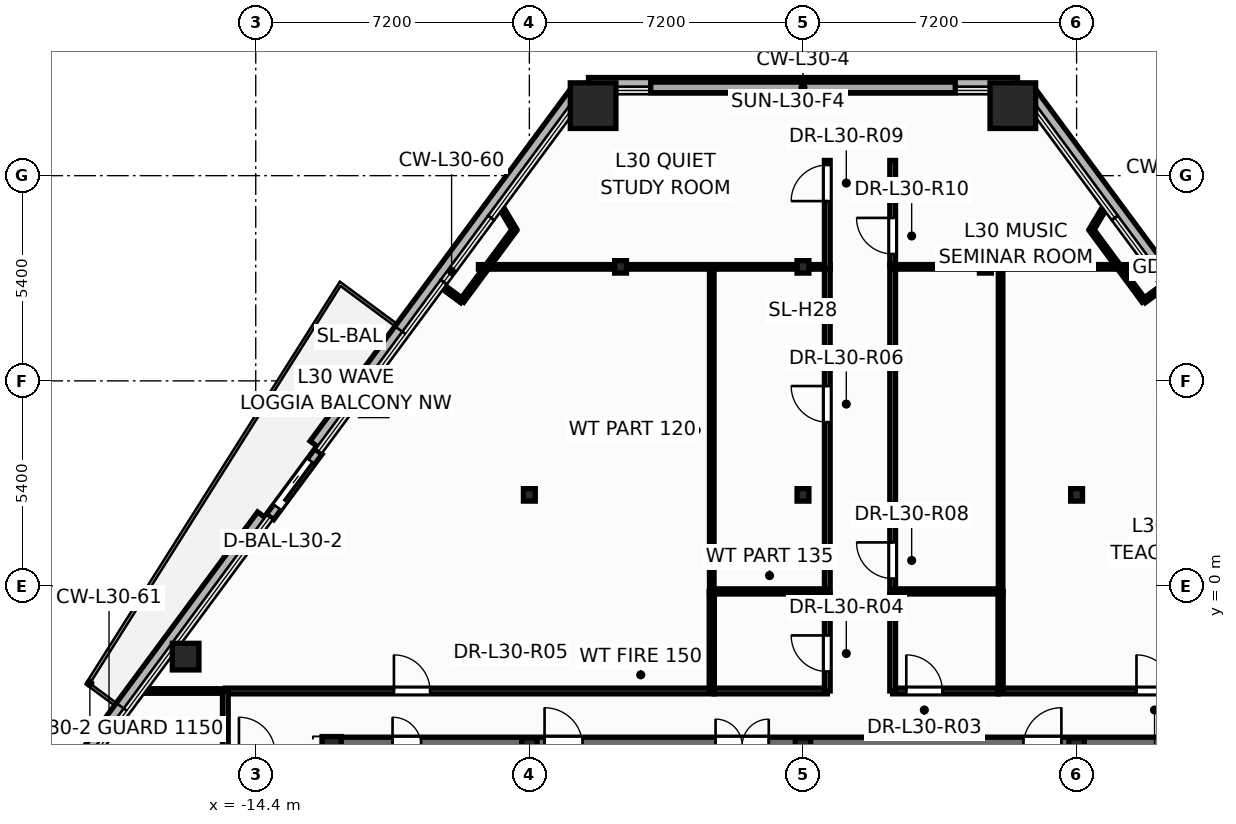
"""IFC4 building model, lengths in metres.
Left out: names, types, materials, properties, quantities, classifications, styles, units other than length and angle.
Written with IfcOpenShell. Run it as: python <this file> out.ifc"""

import sys

from ifc_helpers import new_model, si_unit, direction, frame, frame_2d, origin, origin_2d, place, context, subcontext, project, spatial, rectangle, hollow_rectangle, hollow_circle, i_section, extrude, element, fill, save


model = new_model("IFC4")
c1 = context("Model", 3, precision=1e-05, world=origin(), true_north=direction((0.0, 1.0)))
c2 = subcontext(c1, "Body", "Model", "MODEL_VIEW")
j1 = project(units=[si_unit("LENGTHUNIT", "METRE"), si_unit("PLANEANGLEUNIT", "RADIAN")], contexts=[c1])
p1 = place(None, origin())
s1 = spatial("IfcSite", under=j1, at=p1, CompositionType="ELEMENT")
p2 = place(p1, origin())
s2 = spatial("IfcBuilding", under=s1, at=p2, CompositionType="ELEMENT")
p3 = place(p2, frame((0.0, 0.0, 117.6)))
s3 = spatial("IfcBuildingStorey", under=s2, at=p3, CompositionType="ELEMENT", Elevation=117.6)
for number, where, z_axis, x_axis in (
    (1, (5.522, 12.642, 0.0), (0.0, 0.0, 1.0), (1.0, 0.0, 0.0)),
    (2, (-5.522, 12.642, 0.0), (0.0, 0.0, 1.0), (1.0, 0.0, 0.0)),
):
    element("IfcColumn", number, at=place(p3, frame(where, z_axis=z_axis, x_axis=x_axis)), inside=s3, PredefinedType="COLUMN", context=c2, shape_type="SweptSolid", body=[
        extrude(hollow_rectangle(XDim=1.2, YDim=1.2, WallThickness=0.055, at=origin_2d()), origin(), (0.0, 0.0, 1.0), 4.5),
    ])
for number, where, z_axis, x_axis in (
    (3, (-11.296, 4.836, 0.0), (0.0, 0.0, 1.0), (1.0, 0.0, 0.0)),
    (4, (-16.245, -1.856, 0.0), (0.0, 0.0, 1.0), (1.0, 0.0, 0.0)),
):
    element("IfcColumn", number, at=place(p3, frame(where, z_axis=z_axis, x_axis=x_axis)), inside=s3, PredefinedType="COLUMN", context=c2, shape_type="SweptSolid", body=[
        extrude(hollow_circle(Radius=0.35, WallThickness=0.03, at=origin_2d()), origin(), (0.0, 0.0, 1.0), 4.5),
    ])
p4 = place(p3, frame((-12.4, -4.2, 0.0), z_axis=(0.0, 0.0, 1.0), x_axis=(1.0, 0.0, 0.0)))
e5 = element("IfcColumn", 5, at=p4, inside=s3, PredefinedType="COLUMN", context=c2, shape_type="SweptSolid", body=[
    extrude(i_section(OverallWidth=0.5, OverallDepth=0.482, WebThickness=0.04, FlangeThickness=0.045, at=origin_2d()), origin(), (0.0, 0.0, 1.0), 4.5),
])
for number, where, z_axis, x_axis in (
    (6, (-7.2, -4.2, 0.0), (0.0, 0.0, 1.0), (1.0, 0.0, 0.0)),
    (7, (0.0, -4.2, 0.0), (0.0, 0.0, 1.0), (1.0, 0.0, 0.0)),
    (8, (7.2, -4.2, 0.0), (0.0, 0.0, 1.0), (1.0, 0.0, 0.0)),
):
    element("IfcColumn", number, at=place(p3, frame(where, z_axis=z_axis, x_axis=x_axis)), inside=s3, PredefinedType="PILASTER", context=c2, shape_type="SweptSolid", body=[
        extrude(i_section(OverallWidth=0.405, OverallDepth=0.414, WebThickness=0.022, FlangeThickness=0.032, at=origin_2d()), origin(), (0.0, 0.0, 1.0), 4.5),
    ])
for number, where, z_axis, x_axis in (
    (9, (-7.2, 2.4, 0.0), (0.0, 0.0, 1.0), (1.0, 0.0, 0.0)),
    (10, (0.0, 2.4, 0.0), (0.0, 0.0, 1.0), (1.0, 0.0, 0.0)),
    (11, (7.2, 2.4, 0.0), (0.0, 0.0, 1.0), (1.0, 0.0, 0.0)),
    (12, (-4.8, 8.4, 0.0), (0.0, 0.0, 1.0), (1.0, 0.0, 0.0)),
    (13, (0.0, 8.4, 0.0), (0.0, 0.0, 1.0), (1.0, 0.0, 0.0)),
    (14, (4.8, 8.4, 0.0), (0.0, 0.0, 1.0), (1.0, 0.0, 0.0)),
):
    element("IfcColumn", number, at=place(p3, frame(where, z_axis=z_axis, x_axis=x_axis)), inside=s3, PredefinedType="COLUMN", context=c2, shape_type="SweptSolid", body=[
        extrude(i_section(OverallWidth=0.311, OverallDepth=0.327, WebThickness=0.016, FlangeThickness=0.025, at=origin_2d()), origin(), (0.0, 0.0, 1.0), 4.5),
    ])
p5 = place(p3, frame((14.117, 1.963, -0.2), z_axis=(0.0, 0.0, 1.0), x_axis=(-0.594628189486, 0.804000818575, 0.0)))
e15 = element("IfcWall", 15, at=p5, inside=s3, PredefinedType="PARAPET", context=c2, shape_type="SweptSolid", body=[
    extrude(rectangle(XDim=13.778, YDim=0.36, at=frame_2d((6.889, 0.0))), origin(), (0.0, 0.0, 1.0), 0.38),
])
p6 = place(p3, frame((5.644, 13.202, -0.2), z_axis=(0.0, 0.0, 1.0), x_axis=(-1.0, 0.0, 0.0)))
e16 = element("IfcWall", 16, at=p6, inside=s3, PredefinedType="PARAPET", context=c2, shape_type="SweptSolid", body=[
    extrude(rectangle(XDim=11.289, YDim=0.36, at=frame_2d((5.644, 0.0))), origin(), (0.0, 0.0, 1.0), 0.38),
])
p7 = place(p3, frame((-5.924, 13.041, -0.2), z_axis=(0.0, 0.0, 1.0), x_axis=(-0.594628785206, -0.804000377988, 0.0)))
e17 = element("IfcWall", 17, at=p7, inside=s3, PredefinedType="PARAPET", context=c2, shape_type="SweptSolid", body=[
    extrude(rectangle(XDim=11.607, YDim=0.36, at=frame_2d((5.803, 0.0))), origin(), (0.0, 0.0, 1.0), 0.38),
])
p8 = place(p3, frame((-14.206, 1.843, -0.2), z_axis=(0.0, 0.0, 1.0), x_axis=(-0.594634463254, -0.803996178542, 0.0)))
e18 = element("IfcWall", 18, at=p8, inside=s3, PredefinedType="PARAPET", context=c2, shape_type="SweptSolid", body=[
    extrude(rectangle(XDim=14.072, YDim=0.36, at=frame_2d((7.036, 0.0))), origin(), (0.0, 0.0, 1.0), 0.38),
])
p9 = place(p3, frame((-12.751, 3.541, -0.015), z_axis=(0.0, 0.0, 1.0), x_axis=(-0.594638042479, -0.80399353134, 0.0)))
e19 = element("IfcWall", 19, at=p9, inside=s3, PredefinedType="STANDARD", context=c2, shape_type="SweptSolid", body=[
    extrude(rectangle(XDim=2.14, YDim=0.24, at=frame_2d((1.07, 0.0))), origin(), (0.0, 0.0, 1.0), 3.707),
])
p10 = place(p9, frame((0.32, 0.0, 0.015)))
e20 = element("IfcOpeningElement", 20, at=p10, cuts=e19, PredefinedType="OPENING", context=c2, shape_type="SweptSolid", body=[
    extrude(rectangle(XDim=1.506, YDim=2.204, at=frame_2d((0.75, 1.102))), frame((0.0, 0.13, 0.0), z_axis=(0.0, -1.0, 0.0), x_axis=(1.0, 0.0, 0.0)), (0.0, 0.0, 1.0), 0.26),
])
p11 = place(p3, frame((-12.65, -4.2, 0.0), z_axis=(0.0, 0.0, 1.0), x_axis=(1.0, 0.0, 0.0)))
e21 = element("IfcWall", 21, at=p11, inside=s3, PredefinedType="SHEAR", context=c2, shape_type="SweptSolid", body=[
    extrude(rectangle(XDim=25.3, YDim=0.45, at=frame_2d((12.65, 0.0))), origin(), (0.0, 0.0, 1.0), 4.5),
])
p12 = place(p11, frame((1.85, 0.0, 0.0)))
e22 = element("IfcOpeningElement", 22, at=p12, cuts=e21, PredefinedType="OPENING", context=c2, shape_type="SweptSolid", body=[
    extrude(rectangle(XDim=0.756, YDim=2.054, at=frame_2d((0.375, 1.027))), frame((0.0, 0.235, 0.0), z_axis=(0.0, -1.0, 0.0), x_axis=(1.0, 0.0, 0.0)), (0.0, 0.0, 1.0), 0.47),
])
p13 = place(p11, frame((22.65, 0.0, 0.0)))
e23 = element("IfcOpeningElement", 23, at=p13, cuts=e21, PredefinedType="OPENING", context=c2, shape_type="SweptSolid", body=[
    extrude(rectangle(XDim=0.756, YDim=2.054, at=frame_2d((0.375, 1.027))), frame((0.0, 0.235, 0.0), z_axis=(0.0, -1.0, 0.0), x_axis=(1.0, 0.0, 0.0)), (0.0, 0.0, 1.0), 0.47),
])
p14 = place(p11, frame((5.85, 0.0, 0.0)))
e24 = element("IfcOpeningElement", 24, at=p14, cuts=e21, PredefinedType="OPENING", context=c2, shape_type="SweptSolid", body=[
    extrude(rectangle(XDim=1.006, YDim=2.104, at=frame_2d((0.5, 1.052))), frame((0.0, 0.235, 0.0), z_axis=(0.0, -1.0, 0.0), x_axis=(1.0, 0.0, 0.0)), (0.0, 0.0, 1.0), 0.47),
])
p15 = place(p11, frame((10.35, 0.0, 0.0)))
e25 = element("IfcOpeningElement", 25, at=p15, cuts=e21, PredefinedType="OPENING", context=c2, shape_type="SweptSolid", body=[
    extrude(rectangle(XDim=1.406, YDim=2.154, at=frame_2d((0.7, 1.077))), frame((0.0, 0.235, 0.0), z_axis=(0.0, -1.0, 0.0), x_axis=(1.0, 0.0, 0.0)), (0.0, 0.0, 1.0), 0.47),
])
p16 = place(p11, frame((18.45, 0.0, 0.0)))
e26 = element("IfcOpeningElement", 26, at=p16, cuts=e21, PredefinedType="OPENING", context=c2, shape_type="SweptSolid", body=[
    extrude(rectangle(XDim=1.006, YDim=2.104, at=frame_2d((0.5, 1.052))), frame((0.0, 0.235, 0.0), z_axis=(0.0, -1.0, 0.0), x_axis=(1.0, 0.0, 0.0)), (0.0, 0.0, 1.0), 0.47),
])
p17 = place(p3, frame((-15.2, -2.76, 0.0), z_axis=(0.0, 0.0, 1.0), x_axis=(1.0, 0.0, 0.0)))
e27 = element("IfcWall", 27, at=p17, inside=s3, PredefinedType="PARTITIONING", context=c2, shape_type="SweptSolid", body=[
    extrude(rectangle(XDim=12.86, YDim=0.15, at=frame_2d((6.43, 0.0))), origin(), (0.0, 0.0, 1.0), 3.225),
])
p18 = place(p17, frame((4.436, 0.0, 0.0)))
e28 = element("IfcOpeningElement", 28, at=p18, cuts=e27, PredefinedType="OPENING", context=c2, shape_type="SweptSolid", body=[
    extrude(rectangle(XDim=0.956, YDim=2.104, at=frame_2d((0.475, 1.052))), frame((0.0, 0.085, 0.0), z_axis=(0.0, -1.0, 0.0), x_axis=(1.0, 0.0, 0.0)), (0.0, 0.0, 1.0), 0.17),
])
p19 = place(p3, frame((5.14, -2.76, 0.0), z_axis=(0.0, 0.0, 1.0), x_axis=(1.0, 0.0, 0.0)))
e29 = element("IfcWall", 29, at=p19, inside=s3, PredefinedType="PARTITIONING", context=c2, shape_type="SweptSolid", body=[
    extrude(rectangle(XDim=10.06, YDim=0.15, at=frame_2d((5.03, 0.0))), origin(), (0.0, 0.0, 1.0), 3.225),
])
p20 = place(p19, frame((3.636, 0.0, 0.0)))
e30 = element("IfcOpeningElement", 30, at=p20, cuts=e29, PredefinedType="OPENING", context=c2, shape_type="SweptSolid", body=[
    extrude(rectangle(XDim=0.956, YDim=2.104, at=frame_2d((0.475, 1.052))), frame((0.0, 0.085, 0.0), z_axis=(0.0, -1.0, 0.0), x_axis=(1.0, 0.0, 0.0)), (0.0, 0.0, 1.0), 0.17),
])
p21 = place(p3, frame((0.64, -0.2, 0.0), z_axis=(0.0, 0.0, 1.0), x_axis=(0.0, 1.0, 0.0)))
e31 = element("IfcWall", 31, at=p21, inside=s3, PredefinedType="PARTITIONING", context=c2, shape_type="SweptSolid", body=[
    extrude(rectangle(XDim=8.66, YDim=0.15, at=frame_2d((4.33, 0.0))), origin(), (0.0, 0.0, 1.0), 3.225),
])
p22 = place(p21, frame((4.514, 0.0, 0.0)))
e32 = element("IfcOpeningElement", 32, at=p22, cuts=e31, PredefinedType="OPENING", context=c2, shape_type="SweptSolid", body=[
    extrude(rectangle(XDim=0.956, YDim=2.104, at=frame_2d((0.475, 1.052))), frame((0.0, 0.085, 0.0), z_axis=(0.0, -1.0, 0.0), x_axis=(1.0, 0.0, 0.0)), (0.0, 0.0, 1.0), 0.17),
])
p23 = place(p3, frame((2.36, -0.2, 0.0), z_axis=(0.0, 0.0, 1.0), x_axis=(0.0, 1.0, 0.0)))
e33 = element("IfcWall", 33, at=p23, inside=s3, PredefinedType="PARTITIONING", context=c2, shape_type="SweptSolid", body=[
    extrude(rectangle(XDim=8.66, YDim=0.15, at=frame_2d((4.33, 0.0))), origin(), (0.0, 0.0, 1.0), 3.225),
])
p24 = place(p23, frame((0.4, 0.0, 0.0)))
e34 = element("IfcOpeningElement", 34, at=p24, cuts=e33, PredefinedType="OPENING", context=c2, shape_type="SweptSolid", body=[
    extrude(rectangle(XDim=0.956, YDim=2.104, at=frame_2d((0.475, 1.052))), frame((0.0, 0.085, 0.0), z_axis=(0.0, -1.0, 0.0), x_axis=(1.0, 0.0, 0.0)), (0.0, 0.0, 1.0), 0.17),
])
for number, where, z_axis, x_axis in (
    (35, (-2.4, -0.2, 0.0), (0.0, 0.0, 1.0), (0.0, 1.0, 0.0)),
    (36, (5.2, -0.2, 0.0), (0.0, 0.0, 1.0), (0.0, 1.0, 0.0)),
):
    element("IfcWall", number, at=place(p3, frame(where, z_axis=z_axis, x_axis=x_axis)), inside=s3, PredefinedType="PARTITIONING", context=c2, shape_type="SweptSolid", body=[
        extrude(rectangle(XDim=8.6, YDim=0.12, at=frame_2d((4.3, 0.0))), origin(), (0.0, 0.0, 1.0), 3.225),
    ])
p25 = place(p3, frame((-8.54, 8.4, 0.0), z_axis=(0.0, 0.0, 1.0), x_axis=(1.0, 0.0, 0.0)))
e37 = element("IfcWall", 37, at=p25, inside=s3, PredefinedType="PARTITIONING", context=c2, shape_type="SweptSolid", body=[
    extrude(rectangle(XDim=9.18, YDim=0.12, at=frame_2d((4.59, 0.0))), origin(), (0.0, 0.0, 1.0), 3.225),
])
p26 = place(p3, frame((2.36, 8.4, 0.0), z_axis=(0.0, 0.0, 1.0), x_axis=(1.0, 0.0, 0.0)))
e38 = element("IfcWall", 38, at=p26, inside=s3, PredefinedType="PARTITIONING", context=c2, shape_type="SweptSolid", body=[
    extrude(rectangle(XDim=6.18, YDim=0.12, at=frame_2d((3.09, 0.0))), origin(), (0.0, 0.0, 1.0), 3.517),
])
p27 = place(p3, frame((-2.338, -2.76, 0.0), z_axis=(0.0, 0.0, 1.0), x_axis=(1.0, 0.0, 0.0)))
e39 = element("IfcWall", 39, at=p27, inside=s3, PredefinedType="PARTITIONING", context=c2, shape_type="SweptSolid", body=[
    extrude(rectangle(XDim=2.978, YDim=0.15, at=frame_2d((1.489, 0.0))), origin(), (0.0, 0.0, 1.0), 3.225),
])
p28 = place(p3, frame((-2.4, -0.14, 0.0), z_axis=(0.0, 0.0, 1.0), x_axis=(1.0, 0.0, 0.0)))
e40 = element("IfcWall", 40, at=p28, inside=s3, PredefinedType="PARTITIONING", context=c2, shape_type="SweptSolid", body=[
    extrude(rectangle(XDim=3.04, YDim=0.135, at=frame_2d((1.52, 0.0))), origin(), (0.0, 0.0, 1.0), 3.225),
])
p29 = place(p3, frame((2.36, -2.76, 0.0), z_axis=(0.0, 0.0, 1.0), x_axis=(1.0, 0.0, 0.0)))
e41 = element("IfcWall", 41, at=p29, inside=s3, PredefinedType="PARTITIONING", context=c2, shape_type="SweptSolid", body=[
    extrude(rectangle(XDim=2.778, YDim=0.15, at=frame_2d((1.389, 0.0))), origin(), (0.0, 0.0, 1.0), 3.819),
])
p30 = place(p29, frame((0.359, 0.0, 0.0)))
e42 = element("IfcOpeningElement", 42, at=p30, cuts=e41, PredefinedType="OPENING", context=c2, shape_type="SweptSolid", body=[
    extrude(rectangle(XDim=0.956, YDim=2.104, at=frame_2d((0.475, 1.052))), frame((0.0, 0.085, 0.0), z_axis=(0.0, -1.0, 0.0), x_axis=(1.0, 0.0, 0.0)), (0.0, 0.0, 1.0), 0.17),
])
p31 = place(p3, frame((0.64, 8.34, 0.0), z_axis=(0.0, 0.0, 1.0), x_axis=(0.0, 1.0, 0.0)))
e43 = element("IfcWall", 43, at=p31, inside=s3, PredefinedType="PARTITIONING", context=c2, shape_type="SweptSolid", body=[
    extrude(rectangle(XDim=2.86, YDim=0.15, at=frame_2d((1.43, 0.0))), origin(), (0.0, 0.0, 1.0), 3.517),
])
p32 = place(p31, frame((1.79, 0.0, 0.0)))
e44 = element("IfcOpeningElement", 44, at=p32, cuts=e43, PredefinedType="OPENING", context=c2, shape_type="SweptSolid", body=[
    extrude(rectangle(XDim=0.956, YDim=2.104, at=frame_2d((0.475, 1.052))), frame((0.0, 0.085, 0.0), z_axis=(0.0, -1.0, 0.0), x_axis=(1.0, 0.0, 0.0)), (0.0, 0.0, 1.0), 0.17),
])
p33 = place(p3, frame((2.36, 8.462, 0.0), z_axis=(0.0, 0.0, 1.0), x_axis=(0.0, 1.0, 0.0)))
e45 = element("IfcWall", 45, at=p33, inside=s3, PredefinedType="PARTITIONING", context=c2, shape_type="SweptSolid", body=[
    extrude(rectangle(XDim=2.738, YDim=0.15, at=frame_2d((1.369, 0.0))), origin(), (0.0, 0.0, 1.0), 3.517),
])
p34 = place(p33, frame((0.276, 0.0, 0.0)))
e46 = element("IfcOpeningElement", 46, at=p34, cuts=e45, PredefinedType="OPENING", context=c2, shape_type="SweptSolid", body=[
    extrude(rectangle(XDim=0.956, YDim=2.104, at=frame_2d((0.475, 1.052))), frame((0.0, 0.085, 0.0), z_axis=(0.0, -1.0, 0.0), x_axis=(1.0, 0.0, 0.0)), (0.0, 0.0, 1.0), 0.17),
])
p35 = place(p3, frame((2.36, -0.14, 0.0), z_axis=(0.0, 0.0, 1.0), x_axis=(1.0, 0.0, 0.0)))
e47 = element("IfcWall", 47, at=p35, inside=s3, PredefinedType="PARTITIONING", context=c2, shape_type="SweptSolid", body=[
    extrude(rectangle(XDim=2.84, YDim=0.135, at=frame_2d((1.42, 0.0))), origin(), (0.0, 0.0, 1.0), 3.819),
])
p36 = place(p3, frame((2.36, -2.76, 0.0), z_axis=(0.0, 0.0, 1.0), x_axis=(0.0, 1.0, 0.0)))
e48 = element("IfcWall", 48, at=p36, inside=s3, PredefinedType="PARTITIONING", context=c2, shape_type="SweptSolid", body=[
    extrude(rectangle(XDim=2.558, YDim=0.15, at=frame_2d((1.279, 0.0))), origin(), (0.0, 0.0, 1.0), 4.25),
])
p37 = place(p3, frame((0.64, -2.76, 0.0), z_axis=(0.0, 0.0, 1.0), x_axis=(0.0, 1.0, 0.0)))
e49 = element("IfcWall", 49, at=p37, inside=s3, PredefinedType="PARTITIONING", context=c2, shape_type="SweptSolid", body=[
    extrude(rectangle(XDim=2.558, YDim=0.15, at=frame_2d((1.279, 0.0))), origin(), (0.0, 0.0, 1.0), 4.25),
])
p38 = place(p37, frame((0.512, 0.0, 0.0)))
e50 = element("IfcOpeningElement", 50, at=p38, cuts=e49, PredefinedType="OPENING", context=c2, shape_type="SweptSolid", body=[
    extrude(rectangle(XDim=0.956, YDim=2.104, at=frame_2d((0.475, 1.052))), frame((0.0, 0.085, 0.0), z_axis=(0.0, -1.0, 0.0), x_axis=(1.0, 0.0, 0.0)), (0.0, 0.0, 1.0), 0.17),
])
for number, where, z_axis, x_axis in (
    (51, (5.2, -2.76, 0.0), (0.0, 0.0, 1.0), (0.0, 1.0, 0.0)),
    (52, (-2.4, -2.76, 0.0), (0.0, 0.0, 1.0), (0.0, 1.0, 0.0)),
):
    element("IfcWall", number, at=place(p3, frame(where, z_axis=z_axis, x_axis=x_axis)), inside=s3, PredefinedType="PARTITIONING", context=c2, shape_type="SweptSolid", body=[
        extrude(rectangle(XDim=2.62, YDim=0.135, at=frame_2d((1.31, 0.0))), origin(), (0.0, 0.0, 1.0), 4.25),
    ])
for number, where, z_axis, x_axis in (
    (53, (-7.591, 9.374, 0.0), (0.0, 0.0, 1.0), (-0.595, -0.804, 0.0)),
    (54, (8.973, 7.506, 0.0), (0.0, 0.0, 1.0), (-0.595, 0.804, 0.0)),
):
    element("IfcWall", number, at=place(p3, frame(where, z_axis=z_axis, x_axis=x_axis)), inside=s3, PredefinedType="PARTITIONING", context=c2, shape_type="SweptSolid", body=[
        extrude(rectangle(XDim=2.323, YDim=0.12, at=frame_2d((1.162, 0.0))), origin(), (0.0, 0.0, 1.0), 4.25),
    ])
p39 = place(p3, frame((-17.411, -2.76, 0.0), z_axis=(0.0, 0.0, 1.0), x_axis=(1.0, 0.0, 0.0)))
e55 = element("IfcWall", 55, at=p39, inside=s3, PredefinedType="PARTITIONING", context=c2, shape_type="SweptSolid", body=[
    extrude(rectangle(XDim=2.211, YDim=0.12, at=frame_2d((1.106, 0.0))), origin(), (0.0, 0.0, 1.0), 3.692),
])
p40 = place(p3, frame((-15.2, -4.4, 0.0), z_axis=(0.0, 0.0, 1.0), x_axis=(0.0, 1.0, 0.0)))
e56 = element("IfcWall", 56, at=p40, inside=s3, PredefinedType="PARTITIONING", context=c2, shape_type="SweptSolid", body=[
    extrude(rectangle(XDim=1.64, YDim=0.15, at=frame_2d((0.82, 0.0))), origin(), (0.0, 0.0, 1.0), 4.25),
])
for number, where, z_axis, x_axis in (
    (57, (-7.963, 9.999, 0.0), (0.0, 0.0, 1.0), (0.511, -0.86, 0.0)),
    (58, (7.591, 9.374, 0.0), (0.0, 0.0, 1.0), (0.511, 0.86, 0.0)),
):
    element("IfcWall", number, at=place(p3, frame(where, z_axis=z_axis, x_axis=x_axis)), inside=s3, PredefinedType="PARTITIONING", context=c2, shape_type="SweptSolid", body=[
        extrude(rectangle(XDim=0.727, YDim=0.12, at=frame_2d((0.363, 0.0))), origin(), (0.0, 0.0, 1.0), 3.692),
    ])
for number, where, z_axis, x_axis in (
    (59, (-8.973, 7.506, 0.0), (0.0, 0.0, 1.0), (-0.804, 0.594, 0.0)),
    (60, (9.511, 7.904, 0.0), (0.0, 0.0, 1.0), (-0.804, -0.594, 0.0)),
):
    element("IfcWall", number, at=place(p3, frame(where, z_axis=z_axis, x_axis=x_axis)), inside=s3, PredefinedType="PARTITIONING", context=c2, shape_type="SweptSolid", body=[
        extrude(rectangle(XDim=0.67, YDim=0.12, at=frame_2d((0.335, 0.0))), origin(), (0.0, 0.0, 1.0), 3.692),
    ])
p41 = place(p10, origin())
e61 = element("IfcDoor", 61, at=p41, inside=s3, OperationType="SLIDING_TO_RIGHT", PredefinedType="DOOR", context=c2, shape_type="SweptSolid", body=[
    extrude(rectangle(XDim=1.5, YDim=2.2, at=frame_2d((0.75, 1.1))), frame((0.0, 0.025, 0.0), z_axis=(0.0, -1.0, 0.0), x_axis=(1.0, 0.0, 0.0)), (0.0, 0.0, 1.0), 0.05),
])
fill(e20, e61)
p42 = place(p30, origin())
e62 = element("IfcDoor", 62, at=p42, inside=s3, OperationType="SINGLE_SWING_LEFT", PredefinedType="DOOR", context=c2, shape_type="SweptSolid", body=[
    extrude(rectangle(XDim=0.95, YDim=2.1, at=frame_2d((0.475, 1.05))), frame((0.0, 0.025, 0.0), z_axis=(0.0, -1.0, 0.0), x_axis=(1.0, 0.0, 0.0)), (0.0, 0.0, 1.0), 0.05),
])
fill(e42, e62)
p43 = place(p38, origin())
e63 = element("IfcDoor", 63, at=p43, inside=s3, OperationType="SINGLE_SWING_RIGHT", PredefinedType="DOOR", context=c2, shape_type="SweptSolid", body=[
    extrude(rectangle(XDim=0.95, YDim=2.1, at=frame_2d((0.475, 1.05))), frame((0.0, 0.025, 0.0), z_axis=(0.0, -1.0, 0.0), x_axis=(1.0, 0.0, 0.0)), (0.0, 0.0, 1.0), 0.05),
])
fill(e50, e63)
p44 = place(p18, origin())
e64 = element("IfcDoor", 64, at=p44, inside=s3, OperationType="SINGLE_SWING_LEFT", PredefinedType="DOOR", context=c2, shape_type="SweptSolid", body=[
    extrude(rectangle(XDim=0.95, YDim=2.1, at=frame_2d((0.475, 1.05))), frame((0.0, 0.025, 0.0), z_axis=(0.0, -1.0, 0.0), x_axis=(1.0, 0.0, 0.0)), (0.0, 0.0, 1.0), 0.05),
])
fill(e28, e64)
p45 = place(p22, origin())
e65 = element("IfcDoor", 65, at=p45, inside=s3, OperationType="SINGLE_SWING_RIGHT", PredefinedType="DOOR", context=c2, shape_type="SweptSolid", body=[
    extrude(rectangle(XDim=0.95, YDim=2.1, at=frame_2d((0.475, 1.05))), frame((0.0, 0.025, 0.0), z_axis=(0.0, -1.0, 0.0), x_axis=(1.0, 0.0, 0.0)), (0.0, 0.0, 1.0), 0.05),
])
fill(e32, e65)
p46 = place(p20, origin())
e66 = element("IfcDoor", 66, at=p46, inside=s3, OperationType="SINGLE_SWING_LEFT", PredefinedType="DOOR", context=c2, shape_type="SweptSolid", body=[
    extrude(rectangle(XDim=0.95, YDim=2.1, at=frame_2d((0.475, 1.05))), frame((0.0, 0.025, 0.0), z_axis=(0.0, -1.0, 0.0), x_axis=(1.0, 0.0, 0.0)), (0.0, 0.0, 1.0), 0.05),
])
fill(e30, e66)
p47 = place(p24, origin())
e67 = element("IfcDoor", 67, at=p47, inside=s3, OperationType="SINGLE_SWING_RIGHT", PredefinedType="DOOR", context=c2, shape_type="SweptSolid", body=[
    extrude(rectangle(XDim=0.95, YDim=2.1, at=frame_2d((0.475, 1.05))), frame((0.0, 0.025, 0.0), z_axis=(0.0, -1.0, 0.0), x_axis=(1.0, 0.0, 0.0)), (0.0, 0.0, 1.0), 0.05),
])
fill(e34, e67)
p48 = place(p32, origin())
e68 = element("IfcDoor", 68, at=p48, inside=s3, OperationType="SINGLE_SWING_LEFT", PredefinedType="DOOR", context=c2, shape_type="SweptSolid", body=[
    extrude(rectangle(XDim=0.95, YDim=2.1, at=frame_2d((0.475, 1.05))), frame((0.0, 0.025, 0.0), z_axis=(0.0, -1.0, 0.0), x_axis=(1.0, 0.0, 0.0)), (0.0, 0.0, 1.0), 0.05),
])
fill(e44, e68)
p49 = place(p34, origin())
e69 = element("IfcDoor", 69, at=p49, inside=s3, OperationType="SINGLE_SWING_RIGHT", PredefinedType="DOOR", context=c2, shape_type="SweptSolid", body=[
    extrude(rectangle(XDim=0.95, YDim=2.1, at=frame_2d((0.475, 1.05))), frame((0.0, 0.025, 0.0), z_axis=(0.0, -1.0, 0.0), x_axis=(1.0, 0.0, 0.0)), (0.0, 0.0, 1.0), 0.05),
])
fill(e46, e69)
save(model, sys.argv[1])
